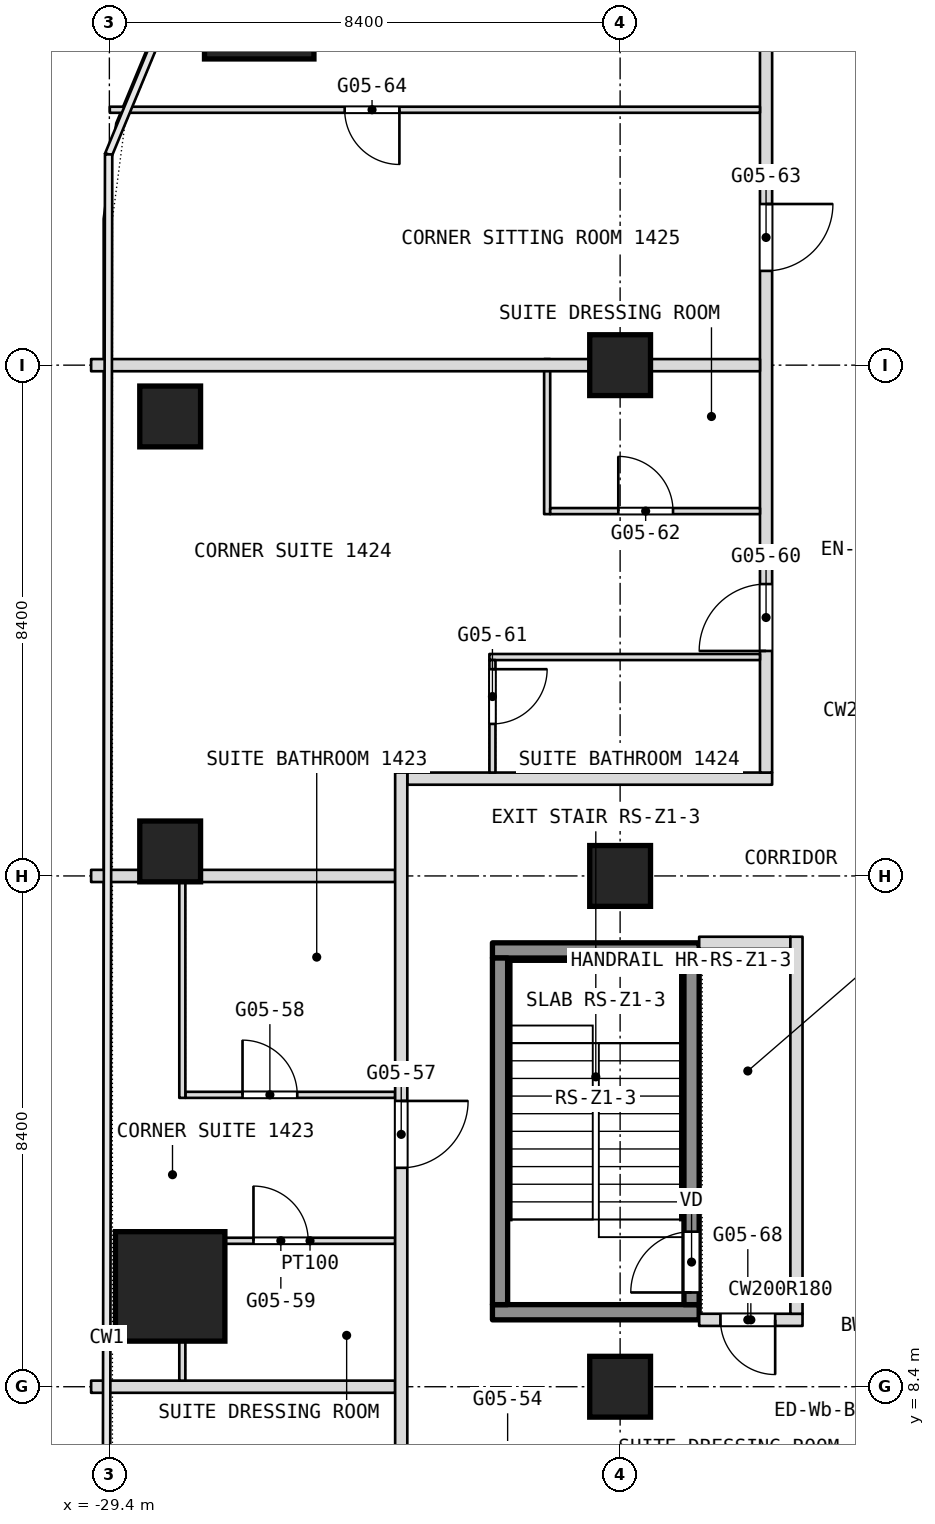
"""IFC4 building model, lengths in metres.
Left out: names, types, materials, properties, quantities, classifications, styles, units other than length and angle.
Written with IfcOpenShell. Run it as: python <this file> out.ifc"""

import sys

from ifc_helpers import new_model, si_unit, direction, frame, frame_2d, origin, origin_2d, place, context, subcontext, project, spatial, rectangle, extrude, element, fill, save


model = new_model("IFC4")
c1 = context("Model", 3, precision=1e-05, world=origin(), true_north=direction((0.0, 1.0)))
c2 = subcontext(c1, "Body", "Model", "MODEL_VIEW")
j1 = project(units=[si_unit("LENGTHUNIT", "METRE"), si_unit("PLANEANGLEUNIT", "RADIAN")], contexts=[c1])
p1 = place(None, origin())
s1 = spatial("IfcSite", under=j1, at=p1, CompositionType="ELEMENT")
p2 = place(p1, origin())
s2 = spatial("IfcBuilding", under=s1, at=p2, CompositionType="ELEMENT")
p3 = place(p2, frame((0.0, 0.0, 65.3)))
s3 = spatial("IfcBuildingStorey", under=s2, at=p3, CompositionType="ELEMENT", Elevation=65.3)
for number, where, z_axis, x_axis in (
    (1, (-26.936, 31.135, 0.0), (0.0, 0.0, 1.0), (1.0, 0.0, 0.0)),
    (2, (-28.4, 10.05, 0.0), (0.0, 0.0, 1.0), (1.0, 0.0, 0.0)),
):
    element("IfcColumn", number, at=place(p3, frame(where, z_axis=z_axis, x_axis=x_axis)), inside=s3, PredefinedType="COLUMN", context=c2, shape_type="SweptSolid", body=[
        extrude(rectangle(XDim=1.8, YDim=1.8, at=origin_2d()), origin(), (0.0, 0.0, 1.0), 3.6),
    ])
for number, where, z_axis, x_axis in (
    (3, (-21.0, 8.4, 0.0), (0.0, 0.0, 1.0), (1.0, 0.0, 0.0)),
    (4, (-21.0, 16.8, 0.0), (0.0, 0.0, 1.0), (1.0, 0.0, 0.0)),
    (5, (-21.0, 25.2, 0.0), (0.0, 0.0, 1.0), (1.0, 0.0, 0.0)),
    (6, (-28.4, 17.203, 0.0), (0.0, 0.0, 1.0), (1.0, 0.0, 0.0)),
    (7, (-28.4, 24.356, 0.0), (0.0, 0.0, 1.0), (1.0, 0.0, 0.0)),
):
    element("IfcColumn", number, at=place(p3, frame(where, z_axis=z_axis, x_axis=x_axis)), inside=s3, PredefinedType="COLUMN", context=c2, shape_type="SweptSolid", body=[
        extrude(rectangle(XDim=1.0, YDim=1.0, at=origin_2d()), origin(), (0.0, 0.0, 1.0), 3.6),
    ])
p4 = place(p3, frame((-29.7, 8.4, 0.0), z_axis=(0.0, 0.0, 1.0), x_axis=(1.0, 0.0, 0.0)))
e8 = element("IfcWall", 8, at=p4, inside=s3, PredefinedType="PARTITIONING", context=c2, shape_type="SweptSolid", body=[
    extrude(rectangle(XDim=5.0, YDim=0.2, at=frame_2d((2.5, 0.0))), origin(), (0.0, 0.0, 1.0), 2.84),
])
p5 = place(p3, frame((-19.7, 9.5, 0.0), z_axis=(0.0, 0.0, 1.0), x_axis=(1.0, 0.0, 0.0)))
e9 = element("IfcWall", 9, at=p5, inside=s3, PredefinedType="PARTITIONING", context=c2, shape_type="SweptSolid", body=[
    extrude(rectangle(XDim=1.7, YDim=0.2, at=frame_2d((0.85, 0.0))), origin(), (0.0, 0.0, 1.0), 3.34),
])
p6 = place(p5, frame((0.35, 0.0, 0.0)))
e10 = element("IfcOpeningElement", 10, at=p6, cuts=e9, PredefinedType="OPENING", context=c2, shape_type="SweptSolid", body=[
    extrude(rectangle(XDim=0.9, YDim=2.1, at=frame_2d((0.45, 1.05))), frame((0.0, 0.1, 0.0), z_axis=(0.0, -1.0, 0.0), x_axis=(1.0, 0.0, 0.0)), (0.0, 0.0, 1.0), 0.2),
])
p7 = place(p3, frame((-27.5, 10.8, 0.0), z_axis=(0.0, 0.0, 1.0), x_axis=(1.0, 0.0, 0.0)))
e11 = element("IfcWall", 11, at=p7, inside=s3, PredefinedType="PARTITIONING", context=c2, shape_type="SweptSolid", body=[
    extrude(rectangle(XDim=2.8, YDim=0.1, at=frame_2d((1.4, 0.0))), origin(), (0.0, 0.0, 1.0), 3.34),
])
p8 = place(p7, frame((0.47, 0.0, 0.0)))
e12 = element("IfcOpeningElement", 12, at=p8, cuts=e11, PredefinedType="OPENING", context=c2, shape_type="SweptSolid", body=[
    extrude(rectangle(XDim=0.9, YDim=2.1, at=frame_2d((0.45, 1.05))), frame((0.0, 0.05, 0.0), z_axis=(0.0, -1.0, 0.0), x_axis=(1.0, 0.0, 0.0)), (0.0, 0.0, 1.0), 0.1),
])
p9 = place(p3, frame((-28.15, 13.2, 0.0), z_axis=(0.0, 0.0, 1.0), x_axis=(1.0, 0.0, 0.0)))
e13 = element("IfcWall", 13, at=p9, inside=s3, PredefinedType="PARTITIONING", context=c2, shape_type="SweptSolid", body=[
    extrude(rectangle(XDim=3.45, YDim=0.1, at=frame_2d((1.725, 0.0))), origin(), (0.0, 0.0, 1.0), 3.34),
])
p10 = place(p9, frame((0.94, 0.0, 0.0)))
e14 = element("IfcOpeningElement", 14, at=p10, cuts=e13, PredefinedType="OPENING", context=c2, shape_type="SweptSolid", body=[
    extrude(rectangle(XDim=0.9, YDim=2.1, at=frame_2d((0.45, 1.05))), frame((0.0, 0.05, 0.0), z_axis=(0.0, -1.0, 0.0), x_axis=(1.0, 0.0, 0.0)), (0.0, 0.0, 1.0), 0.1),
])
p11 = place(p3, frame((-19.7, 15.7, 0.0), z_axis=(0.0, 0.0, 1.0), x_axis=(1.0, 0.0, 0.0)))
e15 = element("IfcWall", 15, at=p11, inside=s3, PredefinedType="PARTITIONING", context=c2, shape_type="SweptSolid", body=[
    extrude(rectangle(XDim=1.5, YDim=0.2, at=frame_2d((0.75, 0.0))), origin(), (0.0, 0.0, 1.0), 3.34),
])
p12 = place(p3, frame((-29.7, 16.8, 0.0), z_axis=(0.0, 0.0, 1.0), x_axis=(1.0, 0.0, 0.0)))
e16 = element("IfcWall", 16, at=p12, inside=s3, PredefinedType="PARTITIONING", context=c2, shape_type="SweptSolid", body=[
    extrude(rectangle(XDim=5.0, YDim=0.2, at=frame_2d((2.5, 0.0))), origin(), (0.0, 0.0, 1.0), 2.84),
])
p13 = place(p3, frame((-18.1, 9.6, 0.0), z_axis=(0.0, 0.0, 1.0), x_axis=(0.0, 1.0, 0.0)))
e17 = element("IfcWall", 17, at=p13, inside=s3, PredefinedType="PARTITIONING", context=c2, shape_type="SweptSolid", body=[
    extrude(rectangle(XDim=6.2, YDim=0.2, at=frame_2d((3.1, 0.0))), origin(), (0.0, 0.0, 1.0), 3.34),
])
p14 = place(p3, frame((-24.5, 18.4, 0.0), z_axis=(0.0, 0.0, 1.0), x_axis=(1.0, 0.0, 0.0)))
e18 = element("IfcWall", 18, at=p14, inside=s3, PredefinedType="PARTITIONING", context=c2, shape_type="SweptSolid", body=[
    extrude(rectangle(XDim=6.0, YDim=0.2, at=frame_2d((3.0, 0.0))), origin(), (0.0, 0.0, 1.0), 3.34),
])
p15 = place(p3, frame((-18.6, 18.5, 0.0), z_axis=(0.0, 0.0, 1.0), x_axis=(0.0, 1.0, 0.0)))
e19 = element("IfcWall", 19, at=p15, inside=s3, PredefinedType="PARTITIONING", context=c2, shape_type="SweptSolid", body=[
    extrude(rectangle(XDim=15.04, YDim=0.2, at=frame_2d((7.52, 0.0))), origin(), (0.0, 0.0, 1.0), 3.34),
])
p16 = place(p15, frame((2.0, 0.0, 0.0)))
e20 = element("IfcOpeningElement", 20, at=p16, cuts=e19, PredefinedType="OPENING", context=c2, shape_type="SweptSolid", body=[
    extrude(rectangle(XDim=1.1, YDim=2.1, at=frame_2d((0.55, 1.05))), frame((0.0, 0.1, 0.0), z_axis=(0.0, -1.0, 0.0), x_axis=(1.0, 0.0, 0.0)), (0.0, 0.0, 1.0), 0.2),
])
p17 = place(p15, frame((8.25, 0.0, 0.0)))
e21 = element("IfcOpeningElement", 21, at=p17, cuts=e19, PredefinedType="OPENING", context=c2, shape_type="SweptSolid", body=[
    extrude(rectangle(XDim=1.1, YDim=2.1, at=frame_2d((0.55, 1.05))), frame((0.0, 0.1, 0.0), z_axis=(0.0, -1.0, 0.0), x_axis=(1.0, 0.0, 0.0)), (0.0, 0.0, 1.0), 0.2),
])
p18 = place(p3, frame((-23.15, 20.4, 0.0), z_axis=(0.0, 0.0, 1.0), x_axis=(1.0, 0.0, 0.0)))
e22 = element("IfcWall", 22, at=p18, inside=s3, PredefinedType="PARTITIONING", context=c2, shape_type="SweptSolid", body=[
    extrude(rectangle(XDim=4.45, YDim=0.1, at=frame_2d((2.225, 0.0))), origin(), (0.0, 0.0, 1.0), 3.34),
])
p19 = place(p3, frame((-22.2, 22.75, 0.0), z_axis=(0.0, 0.0, 1.0), x_axis=(0.0, 1.0, 0.0)))
e23 = element("IfcWall", 23, at=p19, inside=s3, PredefinedType="PARTITIONING", context=c2, shape_type="SweptSolid", body=[
    extrude(rectangle(XDim=2.55, YDim=0.1, at=frame_2d((1.275, 0.0))), origin(), (0.0, 0.0, 1.0), 3.34),
])
p20 = place(p3, frame((-22.15, 22.8, 0.0), z_axis=(0.0, 0.0, 1.0), x_axis=(1.0, 0.0, 0.0)))
e24 = element("IfcWall", 24, at=p20, inside=s3, PredefinedType="PARTITIONING", context=c2, shape_type="SweptSolid", body=[
    extrude(rectangle(XDim=3.45, YDim=0.1, at=frame_2d((1.725, 0.0))), origin(), (0.0, 0.0, 1.0), 3.34),
])
p21 = place(p20, frame((1.12, 0.0, 0.0)))
e25 = element("IfcOpeningElement", 25, at=p21, cuts=e24, PredefinedType="OPENING", context=c2, shape_type="SweptSolid", body=[
    extrude(rectangle(XDim=0.9, YDim=2.1, at=frame_2d((0.45, 1.05))), frame((0.0, 0.05, 0.0), z_axis=(0.0, -1.0, 0.0), x_axis=(1.0, 0.0, 0.0)), (0.0, 0.0, 1.0), 0.1),
])
p22 = place(p3, frame((-23.1, 18.5, 0.0), z_axis=(0.0, 0.0, 1.0), x_axis=(0.0, 1.0, 0.0)))
e26 = element("IfcWall", 26, at=p22, inside=s3, PredefinedType="PARTITIONING", context=c2, shape_type="SweptSolid", body=[
    extrude(rectangle(XDim=1.85, YDim=0.1, at=frame_2d((0.925, 0.0))), origin(), (0.0, 0.0, 1.0), 3.34),
])
p23 = place(p22, frame((0.8, 0.0, 0.0)))
e27 = element("IfcOpeningElement", 27, at=p23, cuts=e26, PredefinedType="OPENING", context=c2, shape_type="SweptSolid", body=[
    extrude(rectangle(XDim=0.9, YDim=2.1, at=frame_2d((0.45, 1.05))), frame((0.0, 0.05, 0.0), z_axis=(0.0, -1.0, 0.0), x_axis=(1.0, 0.0, 0.0)), (0.0, 0.0, 1.0), 0.1),
])
p24 = place(p3, frame((-24.6, 6.9, 0.0), z_axis=(0.0, 0.0, 1.0), x_axis=(0.0, 1.0, 0.0)))
e28 = element("IfcWall", 28, at=p24, inside=s3, PredefinedType="PARTITIONING", context=c2, shape_type="SweptSolid", body=[
    extrude(rectangle(XDim=11.6, YDim=0.2, at=frame_2d((5.8, 0.0))), origin(), (0.0, 0.0, 1.0), 3.34),
])
p25 = place(p24, frame((5.1, 0.0, 0.0)))
e29 = element("IfcOpeningElement", 29, at=p25, cuts=e28, PredefinedType="OPENING", context=c2, shape_type="SweptSolid", body=[
    extrude(rectangle(XDim=1.1, YDim=2.1, at=frame_2d((0.55, 1.05))), frame((0.0, 0.1, 0.0), z_axis=(0.0, -1.0, 0.0), x_axis=(1.0, 0.0, 0.0)), (0.0, 0.0, 1.0), 0.2),
])
p26 = place(p3, frame((-29.7, 25.2, 0.0), z_axis=(0.0, 0.0, 1.0), x_axis=(1.0, 0.0, 0.0)))
e30 = element("IfcWall", 30, at=p26, inside=s3, PredefinedType="PARTITIONING", context=c2, shape_type="SweptSolid", body=[
    extrude(rectangle(XDim=11.0, YDim=0.2, at=frame_2d((5.5, 0.0))), origin(), (0.0, 0.0, 1.0), 2.84),
])
p27 = place(p3, frame((-28.2, 8.5, 0.0), z_axis=(0.0, 0.0, 1.0), x_axis=(0.0, 1.0, 0.0)))
e31 = element("IfcWall", 31, at=p27, inside=s3, PredefinedType="PARTITIONING", context=c2, shape_type="SweptSolid", body=[
    extrude(rectangle(XDim=0.65, YDim=0.1, at=frame_2d((0.325, 0.0))), origin(), (0.0, 0.0, 1.0), 2.94),
])
p28 = place(p3, frame((-28.2, 13.15, 0.0), z_axis=(0.0, 0.0, 1.0), x_axis=(0.0, 1.0, 0.0)))
e32 = element("IfcWall", 32, at=p28, inside=s3, PredefinedType="PARTITIONING", context=c2, shape_type="SweptSolid", body=[
    extrude(rectangle(XDim=3.75, YDim=0.1, at=frame_2d((1.875, 0.0))), origin(), (0.0, 0.0, 1.0), 2.94),
])
p29 = place(p3, frame((-29.393, 29.4, 0.0), z_axis=(0.0, 0.0, 1.0), x_axis=(1.0, 0.0, 0.0)))
e33 = element("IfcWall", 33, at=p29, inside=s3, PredefinedType="PARTITIONING", context=c2, shape_type="SweptSolid", body=[
    extrude(rectangle(XDim=10.693, YDim=0.1, at=frame_2d((5.347, 0.0))), origin(), (0.0, 0.0, 1.0), 3.34),
])
p30 = place(p29, frame((3.863, 0.0, 0.0)))
e34 = element("IfcOpeningElement", 34, at=p30, cuts=e33, PredefinedType="OPENING", context=c2, shape_type="SweptSolid", body=[
    extrude(rectangle(XDim=0.9, YDim=2.1, at=frame_2d((0.45, 1.05))), frame((0.0, 0.05, 0.0), z_axis=(0.0, -1.0, 0.0), x_axis=(1.0, 0.0, 0.0)), (0.0, 0.0, 1.0), 0.1),
])
for number, where, z_axis, x_axis in (
    (35, (-23.1, 9.625, 0.1), (0.0, 0.0, 1.0), (1.0, 0.0, 0.0)),
    (36, (-23.1, 15.575, 0.1), (0.0, 0.0, 1.0), (1.0, 0.0, 0.0)),
):
    element("IfcWall", number, at=place(p3, frame(where, z_axis=z_axis, x_axis=x_axis)), inside=s3, PredefinedType="SHEAR", context=c2, shape_type="SweptSolid", body=[
        extrude(rectangle(XDim=3.4, YDim=0.25, at=frame_2d((1.7, 0.0))), origin(), (0.0, 0.0, 1.0), 3.6),
    ])
p31 = place(p3, frame((-22.975, 9.75, 0.1), z_axis=(0.0, 0.0, 1.0), x_axis=(0.0, 1.0, 0.0)))
e37 = element("IfcWall", 37, at=p31, inside=s3, PredefinedType="SHEAR", context=c2, shape_type="SweptSolid", body=[
    extrude(rectangle(XDim=5.7, YDim=0.25, at=frame_2d((2.85, 0.0))), origin(), (0.0, 0.0, 1.0), 3.6),
])
p32 = place(p3, frame((-19.825, 9.75, 0.1), z_axis=(0.0, 0.0, 1.0), x_axis=(0.0, 1.0, 0.0)))
e38 = element("IfcWall", 38, at=p32, inside=s3, PredefinedType="SHEAR", context=c2, shape_type="SweptSolid", body=[
    extrude(rectangle(XDim=5.7, YDim=0.25, at=frame_2d((2.85, 0.0))), origin(), (0.0, 0.0, 1.0), 3.6),
])
p33 = place(p32, frame((0.2, 0.0, 0.0)))
e39 = element("IfcOpeningElement", 39, at=p33, cuts=e38, PredefinedType="OPENING", context=c2, shape_type="SweptSolid", body=[
    extrude(rectangle(XDim=1.0, YDim=2.1, at=frame_2d((0.5, 1.05))), frame((0.0, 0.125, 0.0), z_axis=(0.0, -1.0, 0.0), x_axis=(1.0, 0.0, 0.0)), (0.0, 0.0, 1.0), 0.25),
])
p34 = place(p6, origin())
e40 = element("IfcDoor", 40, at=p34, inside=s3, OperationType="SINGLE_SWING_RIGHT", PredefinedType="DOOR", context=c2, shape_type="SweptSolid", body=[
    extrude(rectangle(XDim=0.9, YDim=2.1, at=frame_2d((0.45, 1.05))), frame((0.0, 0.025, 0.0), z_axis=(0.0, -1.0, 0.0), x_axis=(1.0, 0.0, 0.0)), (0.0, 0.0, 1.0), 0.05),
])
fill(e10, e40)
p35 = place(p8, origin())
e41 = element("IfcDoor", 41, at=p35, inside=s3, OperationType="SINGLE_SWING_RIGHT", PredefinedType="DOOR", context=c2, shape_type="SweptSolid", body=[
    extrude(rectangle(XDim=0.9, YDim=2.1, at=frame_2d((0.45, 1.05))), frame((0.0, 0.025, 0.0), z_axis=(0.0, -1.0, 0.0), x_axis=(1.0, 0.0, 0.0)), (0.0, 0.0, 1.0), 0.05),
])
fill(e12, e41)
p36 = place(p10, origin())
e42 = element("IfcDoor", 42, at=p36, inside=s3, OperationType="SINGLE_SWING_LEFT", PredefinedType="DOOR", context=c2, shape_type="SweptSolid", body=[
    extrude(rectangle(XDim=0.9, YDim=2.1, at=frame_2d((0.45, 1.05))), frame((0.0, 0.025, 0.0), z_axis=(0.0, -1.0, 0.0), x_axis=(1.0, 0.0, 0.0)), (0.0, 0.0, 1.0), 0.05),
])
fill(e14, e42)
p37 = place(p16, origin())
e43 = element("IfcDoor", 43, at=p37, inside=s3, OperationType="SINGLE_SWING_LEFT", PredefinedType="DOOR", context=c2, shape_type="SweptSolid", body=[
    extrude(rectangle(XDim=1.1, YDim=2.1, at=frame_2d((0.55, 1.05))), frame((0.0, 0.025, 0.0), z_axis=(0.0, -1.0, 0.0), x_axis=(1.0, 0.0, 0.0)), (0.0, 0.0, 1.0), 0.05),
])
fill(e20, e43)
p38 = place(p17, origin())
e44 = element("IfcDoor", 44, at=p38, inside=s3, OperationType="SINGLE_SWING_RIGHT", PredefinedType="DOOR", context=c2, shape_type="SweptSolid", body=[
    extrude(rectangle(XDim=1.1, YDim=2.1, at=frame_2d((0.55, 1.05))), frame((0.0, 0.025, 0.0), z_axis=(0.0, -1.0, 0.0), x_axis=(1.0, 0.0, 0.0)), (0.0, 0.0, 1.0), 0.05),
])
fill(e21, e44)
p39 = place(p21, origin())
e45 = element("IfcDoor", 45, at=p39, inside=s3, OperationType="SINGLE_SWING_LEFT", PredefinedType="DOOR", context=c2, shape_type="SweptSolid", body=[
    extrude(rectangle(XDim=0.9, YDim=2.1, at=frame_2d((0.45, 1.05))), frame((0.0, 0.025, 0.0), z_axis=(0.0, -1.0, 0.0), x_axis=(1.0, 0.0, 0.0)), (0.0, 0.0, 1.0), 0.05),
])
fill(e25, e45)
p40 = place(p23, origin())
e46 = element("IfcDoor", 46, at=p40, inside=s3, OperationType="SINGLE_SWING_LEFT", PredefinedType="DOOR", context=c2, shape_type="SweptSolid", body=[
    extrude(rectangle(XDim=0.9, YDim=2.1, at=frame_2d((0.45, 1.05))), frame((0.0, 0.025, 0.0), z_axis=(0.0, -1.0, 0.0), x_axis=(1.0, 0.0, 0.0)), (0.0, 0.0, 1.0), 0.05),
])
fill(e27, e46)
p41 = place(p25, origin())
e47 = element("IfcDoor", 47, at=p41, inside=s3, OperationType="SINGLE_SWING_RIGHT", PredefinedType="DOOR", context=c2, shape_type="SweptSolid", body=[
    extrude(rectangle(XDim=1.1, YDim=2.1, at=frame_2d((0.55, 1.05))), frame((0.0, 0.025, 0.0), z_axis=(0.0, -1.0, 0.0), x_axis=(1.0, 0.0, 0.0)), (0.0, 0.0, 1.0), 0.05),
])
fill(e29, e47)
p42 = place(p30, origin())
e48 = element("IfcDoor", 48, at=p42, inside=s3, OperationType="SINGLE_SWING_LEFT", PredefinedType="DOOR", context=c2, shape_type="SweptSolid", body=[
    extrude(rectangle(XDim=0.9, YDim=2.1, at=frame_2d((0.45, 1.05))), frame((0.0, 0.025, 0.0), z_axis=(0.0, -1.0, 0.0), x_axis=(1.0, 0.0, 0.0)), (0.0, 0.0, 1.0), 0.05),
])
fill(e34, e48)
p43 = place(p33, origin())
e49 = element("IfcDoor", 49, at=p43, inside=s3, OperationType="SINGLE_SWING_LEFT", PredefinedType="DOOR", context=c2, shape_type="SweptSolid", body=[
    extrude(rectangle(XDim=1.0, YDim=2.1, at=frame_2d((0.5, 1.05))), frame((0.0, 0.025, 0.0), z_axis=(0.0, -1.0, 0.0), x_axis=(1.0, 0.0, 0.0)), (0.0, 0.0, 1.0), 0.05),
])
fill(e39, e49)
save(model, sys.argv[1])
